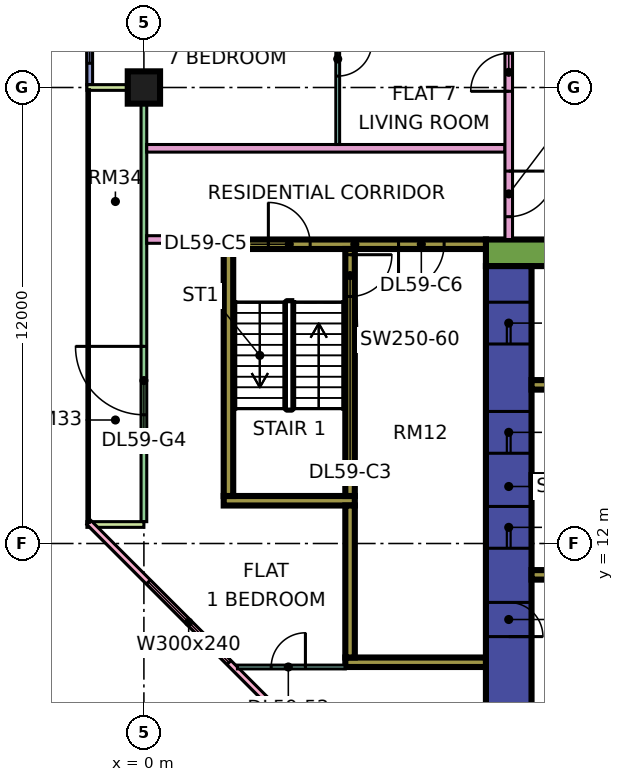
"""IFC4 building model, lengths in metres.
Left out: names, types, materials, properties, quantities, classifications, styles, units other than length and angle.
Written with IfcOpenShell. Run it as: python <this file> out.ifc"""

import sys

from ifc_helpers import new_model, si_unit, direction, frame, frame_2d, origin, origin_2d, place, context, subcontext, project, spatial, rectangle, extrude, element, fill, save


model = new_model("IFC4")
c1 = context("Model", 3, precision=1e-05, world=origin(), true_north=direction((0.0, 1.0)))
c2 = subcontext(c1, "Body", "Model", "MODEL_VIEW")
j1 = project(units=[si_unit("LENGTHUNIT", "METRE"), si_unit("PLANEANGLEUNIT", "RADIAN")], contexts=[c1])
p1 = place(None, origin())
s1 = spatial("IfcSite", under=j1, at=p1, CompositionType="ELEMENT")
p2 = place(p1, origin())
s2 = spatial("IfcBuilding", under=s1, at=p2, CompositionType="ELEMENT")
p3 = place(p2, frame((0.0, 0.0, 249.15)))
s3 = spatial("IfcBuildingStorey", under=s2, at=p3, CompositionType="ELEMENT", Elevation=249.15)
p4 = place(p3, frame((0.0, 24.0, 0.0), z_axis=(0.0, 0.0, 1.0), x_axis=(1.0, 0.0, 0.0)))
e1 = element("IfcColumn", 1, at=p4, inside=s3, PredefinedType="COLUMN", context=c2, shape_type="SweptSolid", body=[
    extrude(rectangle(XDim=0.85, YDim=0.85, at=origin_2d()), origin(), (0.0, 0.0, 1.0), 3.75),
])
p5 = place(p3, frame((9.0, 19.65, 0.0), z_axis=(0.0, 0.0, 1.0), x_axis=(1.0, 0.0, 0.0)))
e2 = element("IfcWall", 2, at=p5, inside=s3, PredefinedType="SHEAR", context=c2, shape_type="SweptSolid", body=[
    extrude(rectangle(XDim=25.0, YDim=0.7, at=frame_2d((12.5, 0.0))), origin(), (0.0, 0.0, 1.0), 3.75),
])
p6 = place(p5, frame((19.1, 0.0, 0.0)))
e3 = element("IfcOpeningElement", 3, at=p6, cuts=e2, PredefinedType="OPENING", context=c2, shape_type="SweptSolid", body=[
    extrude(rectangle(XDim=1.8, YDim=2.4, at=frame_2d((0.9, 1.2))), frame((0.0, 0.36, 0.0), z_axis=(0.0, -1.0, 0.0), x_axis=(1.0, 0.0, 0.0)), (0.0, 0.0, 1.0), 0.72),
])
p7 = place(p3, frame((9.6, 7.7, 0.0), z_axis=(0.0, 0.0, 1.0), x_axis=(0.0, 1.0, 0.0)))
e4 = element("IfcWall", 4, at=p7, inside=s3, PredefinedType="SHEAR", context=c2, shape_type="SweptSolid", body=[
    extrude(rectangle(XDim=11.6, YDim=1.2, at=frame_2d((5.8, 0.0))), origin(), (0.0, 0.0, 1.0), 3.75),
])
p8 = place(p7, frame((4.175, 0.0, 0.0)))
e5 = element("IfcOpeningElement", 5, at=p8, cuts=e4, PredefinedType="OPENING", context=c2, shape_type="SweptSolid", body=[
    extrude(rectangle(XDim=1.1, YDim=2.2, at=frame_2d((0.55, 1.1))), frame((0.0, 0.61, 0.0), z_axis=(0.0, -1.0, 0.0), x_axis=(1.0, 0.0, 0.0)), (0.0, 0.0, 1.0), 1.22),
])
p9 = place(p7, frame((6.675, 0.0, 0.0)))
e6 = element("IfcOpeningElement", 6, at=p9, cuts=e4, PredefinedType="OPENING", context=c2, shape_type="SweptSolid", body=[
    extrude(rectangle(XDim=1.1, YDim=2.2, at=frame_2d((0.55, 1.1))), frame((0.0, 0.61, 0.0), z_axis=(0.0, -1.0, 0.0), x_axis=(1.0, 0.0, 0.0)), (0.0, 0.0, 1.0), 1.22),
])
p10 = place(p7, frame((9.55, 0.0, 0.0)))
e7 = element("IfcOpeningElement", 7, at=p10, cuts=e4, PredefinedType="OPENING", context=c2, shape_type="SweptSolid", body=[
    extrude(rectangle(XDim=1.1, YDim=2.2, at=frame_2d((0.55, 1.1))), frame((0.0, 0.61, 0.0), z_axis=(0.0, -1.0, 0.0), x_axis=(1.0, 0.0, 0.0)), (0.0, 0.0, 1.0), 1.22),
])
p11 = place(p7, frame((1.85, 0.0, 0.0)))
e8 = element("IfcOpeningElement", 8, at=p11, cuts=e4, PredefinedType="OPENING", context=c2, shape_type="SweptSolid", body=[
    extrude(rectangle(XDim=0.9, YDim=2.1, at=frame_2d((0.45, 1.05))), frame((0.0, 0.61, 0.0), z_axis=(0.0, -1.0, 0.0), x_axis=(1.0, 0.0, 0.0)), (0.0, 0.0, 1.0), 1.22),
])
for number, where, z_axis, x_axis in (
    (9, (10.2, 11.175, 0.0), (0.0, 0.0, 1.0), (1.0, 0.0, 0.0)),
    (10, (10.2, 13.675, 0.0), (0.0, 0.0, 1.0), (1.0, 0.0, 0.0)),
    (11, (10.2, 16.175, 0.0), (0.0, 0.0, 1.0), (1.0, 0.0, 0.0)),
):
    element("IfcWall", number, at=place(p3, frame(where, z_axis=z_axis, x_axis=x_axis)), inside=s3, PredefinedType="SHEAR", context=c2, shape_type="SweptSolid", body=[
        extrude(rectangle(XDim=3.0, YDim=0.25, at=frame_2d((1.5, 0.0))), origin(), (0.0, 0.0, 1.0), 3.75),
    ])
p12 = place(p3, frame((2.1, 19.875, 0.0), z_axis=(0.0, 0.0, 1.0), x_axis=(1.0, 0.0, 0.0)))
e12 = element("IfcWall", 12, at=p12, inside=s3, PredefinedType="SHEAR", context=c2, shape_type="SweptSolid", body=[
    extrude(rectangle(XDim=6.9, YDim=0.25, at=frame_2d((3.45, 0.0))), origin(), (0.0, 0.0, 1.0), 3.75),
])
p13 = place(p12, frame((1.175, 0.0, 0.0)))
e13 = element("IfcOpeningElement", 13, at=p13, cuts=e12, PredefinedType="OPENING", context=c2, shape_type="SweptSolid", body=[
    extrude(rectangle(XDim=1.1, YDim=2.2, at=frame_2d((0.55, 1.1))), frame((0.0, 0.135, 0.0), z_axis=(0.0, -1.0, 0.0), x_axis=(1.0, 0.0, 0.0)), (0.0, 0.0, 1.0), 0.27),
])
p14 = place(p12, frame((4.6, 0.0, 0.0)))
e14 = element("IfcOpeningElement", 14, at=p14, cuts=e12, PredefinedType="OPENING", context=c2, shape_type="SweptSolid", body=[
    extrude(rectangle(XDim=1.2, YDim=2.2, at=frame_2d((0.6, 1.1))), frame((0.0, 0.135, 0.0), z_axis=(0.0, -1.0, 0.0), x_axis=(1.0, 0.0, 0.0)), (0.0, 0.0, 1.0), 0.27),
])
p15 = place(p3, frame((2.1, 13.125, 0.0), z_axis=(0.0, 0.0, 1.0), x_axis=(1.0, 0.0, 0.0)))
e15 = element("IfcWall", 15, at=p15, inside=s3, PredefinedType="SHEAR", context=c2, shape_type="SweptSolid", body=[
    extrude(rectangle(XDim=3.45, YDim=0.25, at=frame_2d((1.725, 0.0))), origin(), (0.0, 0.0, 1.0), 3.75),
])
p16 = place(p3, frame((2.225, 13.25, 0.0), z_axis=(0.0, 0.0, 1.0), x_axis=(0.0, 1.0, 0.0)))
e16 = element("IfcWall", 16, at=p16, inside=s3, PredefinedType="SHEAR", context=c2, shape_type="SweptSolid", body=[
    extrude(rectangle(XDim=6.5, YDim=0.25, at=frame_2d((3.25, 0.0))), origin(), (0.0, 0.0, 1.0), 3.75),
])
p17 = place(p3, frame((5.425, 13.25, 0.0), z_axis=(0.0, 0.0, 1.0), x_axis=(0.0, 1.0, 0.0)))
e17 = element("IfcWall", 17, at=p17, inside=s3, PredefinedType="SHEAR", context=c2, shape_type="SweptSolid", body=[
    extrude(rectangle(XDim=6.5, YDim=0.25, at=frame_2d((3.25, 0.0))), origin(), (0.0, 0.0, 1.0), 3.75),
])
p18 = place(p17, frame((5.25, 0.0, 0.0)))
e18 = element("IfcOpeningElement", 18, at=p18, cuts=e17, PredefinedType="OPENING", context=c2, shape_type="SweptSolid", body=[
    extrude(rectangle(XDim=1.1, YDim=2.2, at=frame_2d((0.55, 1.1))), frame((0.0, 0.135, 0.0), z_axis=(0.0, -1.0, 0.0), x_axis=(1.0, 0.0, 0.0)), (0.0, 0.0, 1.0), 0.27),
])
p19 = place(p3, frame((5.3, 8.875, 0.0), z_axis=(0.0, 0.0, 1.0), x_axis=(1.0, 0.0, 0.0)))
e19 = element("IfcWall", 19, at=p19, inside=s3, PredefinedType="SHEAR", context=c2, shape_type="SweptSolid", body=[
    extrude(rectangle(XDim=3.7, YDim=0.25, at=frame_2d((1.85, 0.0))), origin(), (0.0, 0.0, 1.0), 3.75),
])
p20 = place(p3, frame((5.425, 9.0, 0.0), z_axis=(0.0, 0.0, 1.0), x_axis=(0.0, 1.0, 0.0)))
e20 = element("IfcWall", 20, at=p20, inside=s3, PredefinedType="SHEAR", context=c2, shape_type="SweptSolid", body=[
    extrude(rectangle(XDim=4.0, YDim=0.25, at=frame_2d((2.0, 0.0))), origin(), (0.0, 0.0, 1.0), 3.75),
])
p21 = place(p3, frame((-1.425, 35.925, 0.0), z_axis=(0.0, 0.0, 1.0), x_axis=(0.0, -1.0, 0.0)))
e21 = element("IfcWall", 21, at=p21, inside=s3, PredefinedType="SOLIDWALL", context=c2, shape_type="SweptSolid", body=[
    extrude(rectangle(XDim=11.85, YDim=0.15, at=frame_2d((5.925, 0.0))), origin(), (0.0, 0.0, 1.0), 3.35),
])
p22 = place(p21, frame((0.562, 0.0, 0.45)))
e22 = element("IfcOpeningElement", 22, at=p22, cuts=e21, PredefinedType="OPENING", context=c2, shape_type="SweptSolid", body=[
    extrude(rectangle(XDim=1.8, YDim=2.4, at=frame_2d((0.9, 1.2))), frame((0.0, 0.085, 0.0), z_axis=(0.0, -1.0, 0.0), x_axis=(1.0, 0.0, 0.0)), (0.0, 0.0, 1.0), 0.17),
])
p23 = place(p21, frame((3.525, 0.0, 0.45)))
e23 = element("IfcOpeningElement", 23, at=p23, cuts=e21, PredefinedType="OPENING", context=c2, shape_type="SweptSolid", body=[
    extrude(rectangle(XDim=1.8, YDim=2.4, at=frame_2d((0.9, 1.2))), frame((0.0, 0.085, 0.0), z_axis=(0.0, -1.0, 0.0), x_axis=(1.0, 0.0, 0.0)), (0.0, 0.0, 1.0), 0.17),
])
p24 = place(p21, frame((6.525, 0.0, 0.45)))
e24 = element("IfcOpeningElement", 24, at=p24, cuts=e21, PredefinedType="OPENING", context=c2, shape_type="SweptSolid", body=[
    extrude(rectangle(XDim=1.8, YDim=2.4, at=frame_2d((0.9, 1.2))), frame((0.0, 0.085, 0.0), z_axis=(0.0, -1.0, 0.0), x_axis=(1.0, 0.0, 0.0)), (0.0, 0.0, 1.0), 0.17),
])
p25 = place(p21, frame((9.488, 0.0, 0.45)))
e25 = element("IfcOpeningElement", 25, at=p25, cuts=e21, PredefinedType="OPENING", context=c2, shape_type="SweptSolid", body=[
    extrude(rectangle(XDim=1.8, YDim=2.4, at=frame_2d((0.9, 1.2))), frame((0.0, 0.085, 0.0), z_axis=(0.0, -1.0, 0.0), x_axis=(1.0, 0.0, 0.0)), (0.0, 0.0, 1.0), 0.17),
])
p26 = place(p3, frame((0.0, 23.925, 0.0), z_axis=(0.0, 0.0, 1.0), x_axis=(0.0, -1.0, 0.0)))
e26 = element("IfcWall", 26, at=p26, inside=s3, PredefinedType="SOLIDWALL", context=c2, shape_type="SweptSolid", body=[
    extrude(rectangle(XDim=11.35, YDim=0.15, at=frame_2d((5.675, 0.0))), origin(), (0.0, 0.0, 1.0), 3.35),
])
p27 = place(p26, frame((6.738, 0.0, 0.0)))
e27 = element("IfcOpeningElement", 27, at=p27, cuts=e26, PredefinedType="OPENING", context=c2, shape_type="SweptSolid", body=[
    extrude(rectangle(XDim=1.8, YDim=2.4, at=frame_2d((0.9, 1.2))), frame((0.0, 0.085, 0.0), z_axis=(0.0, -1.0, 0.0), x_axis=(1.0, 0.0, 0.0)), (0.0, 0.0, 1.0), 0.17),
])
for number, where, z_axis, x_axis in (
    (28, (-1.5, 24.0, 0.0), (0.0, 0.0, 1.0), (1.0, 0.0, 0.0)),
    (29, (-1.5, 12.5, 0.0), (0.0, 0.0, 1.0), (1.0, 0.0, 0.0)),
):
    element("IfcWall", number, at=place(p3, frame(where, z_axis=z_axis, x_axis=x_axis)), inside=s3, PredefinedType="SOLIDWALL", context=c2, shape_type="SweptSolid", body=[
        extrude(rectangle(XDim=1.5, YDim=0.15, at=frame_2d((0.75, 0.0))), origin(), (0.0, 0.0, 1.0), 3.35),
    ])
p28 = place(p3, frame((-1.447, 12.553, 0.0), z_axis=(0.0, 0.0, 1.0), x_axis=(0.707106781187, -0.707106781187, 0.0)))
e30 = element("IfcWall", 30, at=p28, inside=s3, PredefinedType="SOLIDWALL", context=c2, shape_type="SweptSolid", body=[
    extrude(rectangle(XDim=19.799, YDim=0.15, at=frame_2d((9.899, 0.0))), origin(), (0.0, 0.0, 1.0), 3.35),
])
p29 = place(p28, frame((2.212, 0.0, 0.45)))
e31 = element("IfcOpeningElement", 31, at=p29, cuts=e30, PredefinedType="OPENING", context=c2, shape_type="SweptSolid", body=[
    extrude(rectangle(XDim=3.0, YDim=2.4, at=frame_2d((1.5, 1.2))), frame((0.0, 0.085, 0.0), z_axis=(0.0, -1.0, 0.0), x_axis=(1.0, 0.0, 0.0)), (0.0, 0.0, 1.0), 0.17),
])
p30 = place(p28, frame((10.216, 0.0, 0.45)))
e32 = element("IfcOpeningElement", 32, at=p30, cuts=e30, PredefinedType="OPENING", context=c2, shape_type="SweptSolid", body=[
    extrude(rectangle(XDim=3.0, YDim=2.4, at=frame_2d((1.5, 1.2))), frame((0.0, 0.085, 0.0), z_axis=(0.0, -1.0, 0.0), x_axis=(1.0, 0.0, 0.0)), (0.0, 0.0, 1.0), 0.17),
])
p31 = place(p3, frame((0.074, 20.0, 0.0), z_axis=(0.0, 0.0, 1.0), x_axis=(1.0, 0.0, 0.0)))
e33 = element("IfcWall", 33, at=p31, inside=s3, PredefinedType="PARTITIONING", context=c2, shape_type="SweptSolid", body=[
    extrude(rectangle(XDim=2.026, YDim=0.2, at=frame_2d((1.013, 0.0))), origin(), (0.0, 0.0, 1.0), 3.35),
])
p32 = place(p3, frame((0.074, 22.4, 0.0), z_axis=(0.0, 0.0, 1.0), x_axis=(1.0, 0.0, 0.0)))
e34 = element("IfcWall", 34, at=p32, inside=s3, PredefinedType="PARTITIONING", context=c2, shape_type="SweptSolid", body=[
    extrude(rectangle(XDim=9.426, YDim=0.2, at=frame_2d((4.713, 0.0))), origin(), (0.0, 0.0, 1.0), 3.35),
])
p33 = place(p3, frame((2.461, 8.75, 0.0), z_axis=(0.0, 0.0, 1.0), x_axis=(1.0, 0.0, 0.0)))
e35 = element("IfcWall", 35, at=p33, inside=s3, PredefinedType="PARTITIONING", context=c2, shape_type="SweptSolid", body=[
    extrude(rectangle(XDim=2.839, YDim=0.1, at=frame_2d((1.419, 0.0))), origin(), (0.0, 0.0, 1.0), 3.35),
])
p34 = place(p33, frame((0.889, 0.0, 0.0)))
e36 = element("IfcOpeningElement", 36, at=p34, cuts=e35, PredefinedType="OPENING", context=c2, shape_type="SweptSolid", body=[
    extrude(rectangle(XDim=0.9, YDim=2.1, at=frame_2d((0.45, 1.05))), frame((0.0, 0.06, 0.0), z_axis=(0.0, -1.0, 0.0), x_axis=(1.0, 0.0, 0.0)), (0.0, 0.0, 1.0), 0.12),
])
p35 = place(p3, frame((5.1, 22.5, 0.0), z_axis=(0.0, 0.0, 1.0), x_axis=(0.0, 1.0, 0.0)))
e37 = element("IfcWall", 37, at=p35, inside=s3, PredefinedType="PARTITIONING", context=c2, shape_type="SweptSolid", body=[
    extrude(rectangle(XDim=10.55, YDim=0.1, at=frame_2d((5.275, 0.0))), origin(), (0.0, 0.0, 1.0), 3.35),
])
p36 = place(p35, frame((1.8, 0.0, 0.0)))
e38 = element("IfcOpeningElement", 38, at=p36, cuts=e37, PredefinedType="OPENING", context=c2, shape_type="SweptSolid", body=[
    extrude(rectangle(XDim=0.9, YDim=2.1, at=frame_2d((0.45, 1.05))), frame((0.0, 0.06, 0.0), z_axis=(0.0, -1.0, 0.0), x_axis=(1.0, 0.0, 0.0)), (0.0, 0.0, 1.0), 0.12),
])
p37 = place(p35, frame((5.55, 0.0, 0.0)))
e39 = element("IfcOpeningElement", 39, at=p37, cuts=e37, PredefinedType="OPENING", context=c2, shape_type="SweptSolid", body=[
    extrude(rectangle(XDim=0.9, YDim=2.1, at=frame_2d((0.45, 1.05))), frame((0.0, 0.06, 0.0), z_axis=(0.0, -1.0, 0.0), x_axis=(1.0, 0.0, 0.0)), (0.0, 0.0, 1.0), 0.12),
])
p38 = place(p35, frame((8.55, 0.0, 0.0)))
e40 = element("IfcOpeningElement", 40, at=p38, cuts=e37, PredefinedType="OPENING", context=c2, shape_type="SweptSolid", body=[
    extrude(rectangle(XDim=0.9, YDim=2.1, at=frame_2d((0.45, 1.05))), frame((0.0, 0.06, 0.0), z_axis=(0.0, -1.0, 0.0), x_axis=(1.0, 0.0, 0.0)), (0.0, 0.0, 1.0), 0.12),
])
p39 = place(p3, frame((9.6, 20.0, 0.0), z_axis=(0.0, 0.0, 1.0), x_axis=(0.0, 1.0, 0.0)))
e41 = element("IfcWall", 41, at=p39, inside=s3, PredefinedType="PARTITIONING", context=c2, shape_type="SweptSolid", body=[
    extrude(rectangle(XDim=44.35, YDim=0.2, at=frame_2d((22.175, 0.0))), origin(), (0.0, 0.0, 1.0), 3.35),
])
p40 = place(p39, frame((28.8, 0.0, 0.0)))
e42 = element("IfcOpeningElement", 42, at=p40, cuts=e41, PredefinedType="OPENING", context=c2, shape_type="SweptSolid", body=[
    extrude(rectangle(XDim=1.0, YDim=2.1, at=frame_2d((0.5, 1.05))), frame((0.0, 0.11, 0.0), z_axis=(0.0, -1.0, 0.0), x_axis=(1.0, 0.0, 0.0)), (0.0, 0.0, 1.0), 0.22),
])
p41 = place(p39, frame((0.6, 0.0, 0.0)))
e43 = element("IfcOpeningElement", 43, at=p41, cuts=e41, PredefinedType="OPENING", context=c2, shape_type="SweptSolid", body=[
    extrude(rectangle(XDim=1.2, YDim=2.1, at=frame_2d((0.6, 1.05))), frame((0.0, 0.11, 0.0), z_axis=(0.0, -1.0, 0.0), x_axis=(1.0, 0.0, 0.0)), (0.0, 0.0, 1.0), 0.22),
])
p42 = place(p39, frame((3.9, 0.0, 0.0)))
e44 = element("IfcOpeningElement", 44, at=p42, cuts=e41, PredefinedType="OPENING", context=c2, shape_type="SweptSolid", body=[
    extrude(rectangle(XDim=1.0, YDim=2.1, at=frame_2d((0.5, 1.05))), frame((0.0, 0.11, 0.0), z_axis=(0.0, -1.0, 0.0), x_axis=(1.0, 0.0, 0.0)), (0.0, 0.0, 1.0), 0.22),
])
p43 = place(p25, origin())
e45 = element("IfcWindow", 45, at=p43, inside=s3, PartitioningType="SINGLE_PANEL", PredefinedType="WINDOW", context=c2, shape_type="SweptSolid", body=[
    extrude(rectangle(XDim=1.8, YDim=2.4, at=frame_2d((0.9, 1.2))), frame((0.0, 0.03, 0.0), z_axis=(0.0, -1.0, 0.0), x_axis=(1.0, 0.0, 0.0)), (0.0, 0.0, 1.0), 0.06),
])
fill(e25, e45)
p44 = place(p27, frame((1.8, 0.0, 0.0), z_axis=(0.0, 0.0, 1.0), x_axis=(-1.0, 0.0, 0.0)))
e46 = element("IfcDoor", 46, at=p44, inside=s3, OperationType="DOUBLE_DOOR_SINGLE_SWING", PredefinedType="DOOR", context=c2, shape_type="SweptSolid", body=[
    extrude(rectangle(XDim=1.8, YDim=2.4, at=frame_2d((0.9, 1.2))), frame((0.0, 0.025, 0.0), z_axis=(0.0, -1.0, 0.0), x_axis=(1.0, 0.0, 0.0)), (0.0, 0.0, 1.0), 0.05),
])
fill(e27, e46)
p45 = place(p29, origin())
e47 = element("IfcWindow", 47, at=p45, inside=s3, PartitioningType="SINGLE_PANEL", PredefinedType="WINDOW", context=c2, shape_type="SweptSolid", body=[
    extrude(rectangle(XDim=3.0, YDim=2.4, at=frame_2d((1.5, 1.2))), frame((0.0, 0.03, 0.0), z_axis=(0.0, -1.0, 0.0), x_axis=(1.0, 0.0, 0.0)), (0.0, 0.0, 1.0), 0.06),
])
fill(e31, e47)
p46 = place(p8, origin())
e48 = element("IfcDoor", 48, at=p46, inside=s3, OperationType="DOUBLE_DOOR_SLIDING", PredefinedType="DOOR", context=c2, shape_type="SweptSolid", body=[
    extrude(rectangle(XDim=1.1, YDim=2.2, at=frame_2d((0.55, 1.1))), frame((0.0, 0.025, 0.0), z_axis=(0.0, -1.0, 0.0), x_axis=(1.0, 0.0, 0.0)), (0.0, 0.0, 1.0), 0.05),
])
fill(e5, e48)
p47 = place(p9, origin())
e49 = element("IfcDoor", 49, at=p47, inside=s3, OperationType="DOUBLE_DOOR_SLIDING", PredefinedType="DOOR", context=c2, shape_type="SweptSolid", body=[
    extrude(rectangle(XDim=1.1, YDim=2.2, at=frame_2d((0.55, 1.1))), frame((0.0, 0.025, 0.0), z_axis=(0.0, -1.0, 0.0), x_axis=(1.0, 0.0, 0.0)), (0.0, 0.0, 1.0), 0.05),
])
fill(e6, e49)
p48 = place(p10, origin())
e50 = element("IfcDoor", 50, at=p48, inside=s3, OperationType="DOUBLE_DOOR_SLIDING", PredefinedType="DOOR", context=c2, shape_type="SweptSolid", body=[
    extrude(rectangle(XDim=1.1, YDim=2.2, at=frame_2d((0.55, 1.1))), frame((0.0, 0.025, 0.0), z_axis=(0.0, -1.0, 0.0), x_axis=(1.0, 0.0, 0.0)), (0.0, 0.0, 1.0), 0.05),
])
fill(e7, e50)
p49 = place(p18, origin())
e51 = element("IfcDoor", 51, at=p49, inside=s3, OperationType="SINGLE_SWING_RIGHT", PredefinedType="DOOR", context=c2, shape_type="SweptSolid", body=[
    extrude(rectangle(XDim=1.1, YDim=2.2, at=frame_2d((0.55, 1.1))), frame((0.0, 0.025, 0.0), z_axis=(0.0, -1.0, 0.0), x_axis=(1.0, 0.0, 0.0)), (0.0, 0.0, 1.0), 0.05),
])
fill(e18, e51)
p50 = place(p11, frame((0.9, 0.0, 0.0), z_axis=(0.0, 0.0, 1.0), x_axis=(-1.0, 0.0, 0.0)))
e52 = element("IfcDoor", 52, at=p50, inside=s3, OperationType="SINGLE_SWING_LEFT", PredefinedType="DOOR", context=c2, shape_type="SweptSolid", body=[
    extrude(rectangle(XDim=0.9, YDim=2.1, at=frame_2d((0.45, 1.05))), frame((0.0, 0.025, 0.0), z_axis=(0.0, -1.0, 0.0), x_axis=(1.0, 0.0, 0.0)), (0.0, 0.0, 1.0), 0.05),
])
fill(e8, e52)
p51 = place(p13, origin())
e53 = element("IfcDoor", 53, at=p51, inside=s3, OperationType="SINGLE_SWING_LEFT", PredefinedType="DOOR", context=c2, shape_type="SweptSolid", body=[
    extrude(rectangle(XDim=1.1, YDim=2.2, at=frame_2d((0.55, 1.1))), frame((0.0, 0.025, 0.0), z_axis=(0.0, -1.0, 0.0), x_axis=(1.0, 0.0, 0.0)), (0.0, 0.0, 1.0), 0.05),
])
fill(e13, e53)
p52 = place(p14, frame((1.2, 0.0, 0.0), z_axis=(0.0, 0.0, 1.0), x_axis=(-1.0, 0.0, 0.0)))
e54 = element("IfcDoor", 54, at=p52, inside=s3, OperationType="SINGLE_SWING_LEFT", PredefinedType="DOOR", context=c2, shape_type="SweptSolid", body=[
    extrude(rectangle(XDim=1.2, YDim=2.2, at=frame_2d((0.6, 1.1))), frame((0.0, 0.025, 0.0), z_axis=(0.0, -1.0, 0.0), x_axis=(1.0, 0.0, 0.0)), (0.0, 0.0, 1.0), 0.05),
])
fill(e14, e54)
p53 = place(p41, origin())
e55 = element("IfcDoor", 55, at=p53, inside=s3, OperationType="SINGLE_SWING_RIGHT", PredefinedType="DOOR", context=c2, shape_type="SweptSolid", body=[
    extrude(rectangle(XDim=1.2, YDim=2.1, at=frame_2d((0.6, 1.05))), frame((0.0, 0.025, 0.0), z_axis=(0.0, -1.0, 0.0), x_axis=(1.0, 0.0, 0.0)), (0.0, 0.0, 1.0), 0.05),
])
fill(e43, e55)
p54 = place(p34, frame((0.9, 0.0, 0.0), z_axis=(0.0, 0.0, 1.0), x_axis=(-1.0, 0.0, 0.0)))
e56 = element("IfcDoor", 56, at=p54, inside=s3, OperationType="SINGLE_SWING_RIGHT", PredefinedType="DOOR", context=c2, shape_type="SweptSolid", body=[
    extrude(rectangle(XDim=0.9, YDim=2.1, at=frame_2d((0.45, 1.05))), frame((0.0, 0.025, 0.0), z_axis=(0.0, -1.0, 0.0), x_axis=(1.0, 0.0, 0.0)), (0.0, 0.0, 1.0), 0.05),
])
fill(e36, e56)
p55 = place(p36, origin())
e57 = element("IfcDoor", 57, at=p55, inside=s3, OperationType="SINGLE_SWING_RIGHT", PredefinedType="DOOR", context=c2, shape_type="SweptSolid", body=[
    extrude(rectangle(XDim=0.9, YDim=2.1, at=frame_2d((0.45, 1.05))), frame((0.0, 0.025, 0.0), z_axis=(0.0, -1.0, 0.0), x_axis=(1.0, 0.0, 0.0)), (0.0, 0.0, 1.0), 0.05),
])
fill(e38, e57)
p56 = place(p42, origin())
e58 = element("IfcDoor", 58, at=p56, inside=s3, OperationType="SINGLE_SWING_LEFT", PredefinedType="DOOR", context=c2, shape_type="SweptSolid", body=[
    extrude(rectangle(XDim=1.0, YDim=2.1, at=frame_2d((0.5, 1.05))), frame((0.0, 0.025, 0.0), z_axis=(0.0, -1.0, 0.0), x_axis=(1.0, 0.0, 0.0)), (0.0, 0.0, 1.0), 0.05),
])
fill(e44, e58)
save(model, sys.argv[1])
